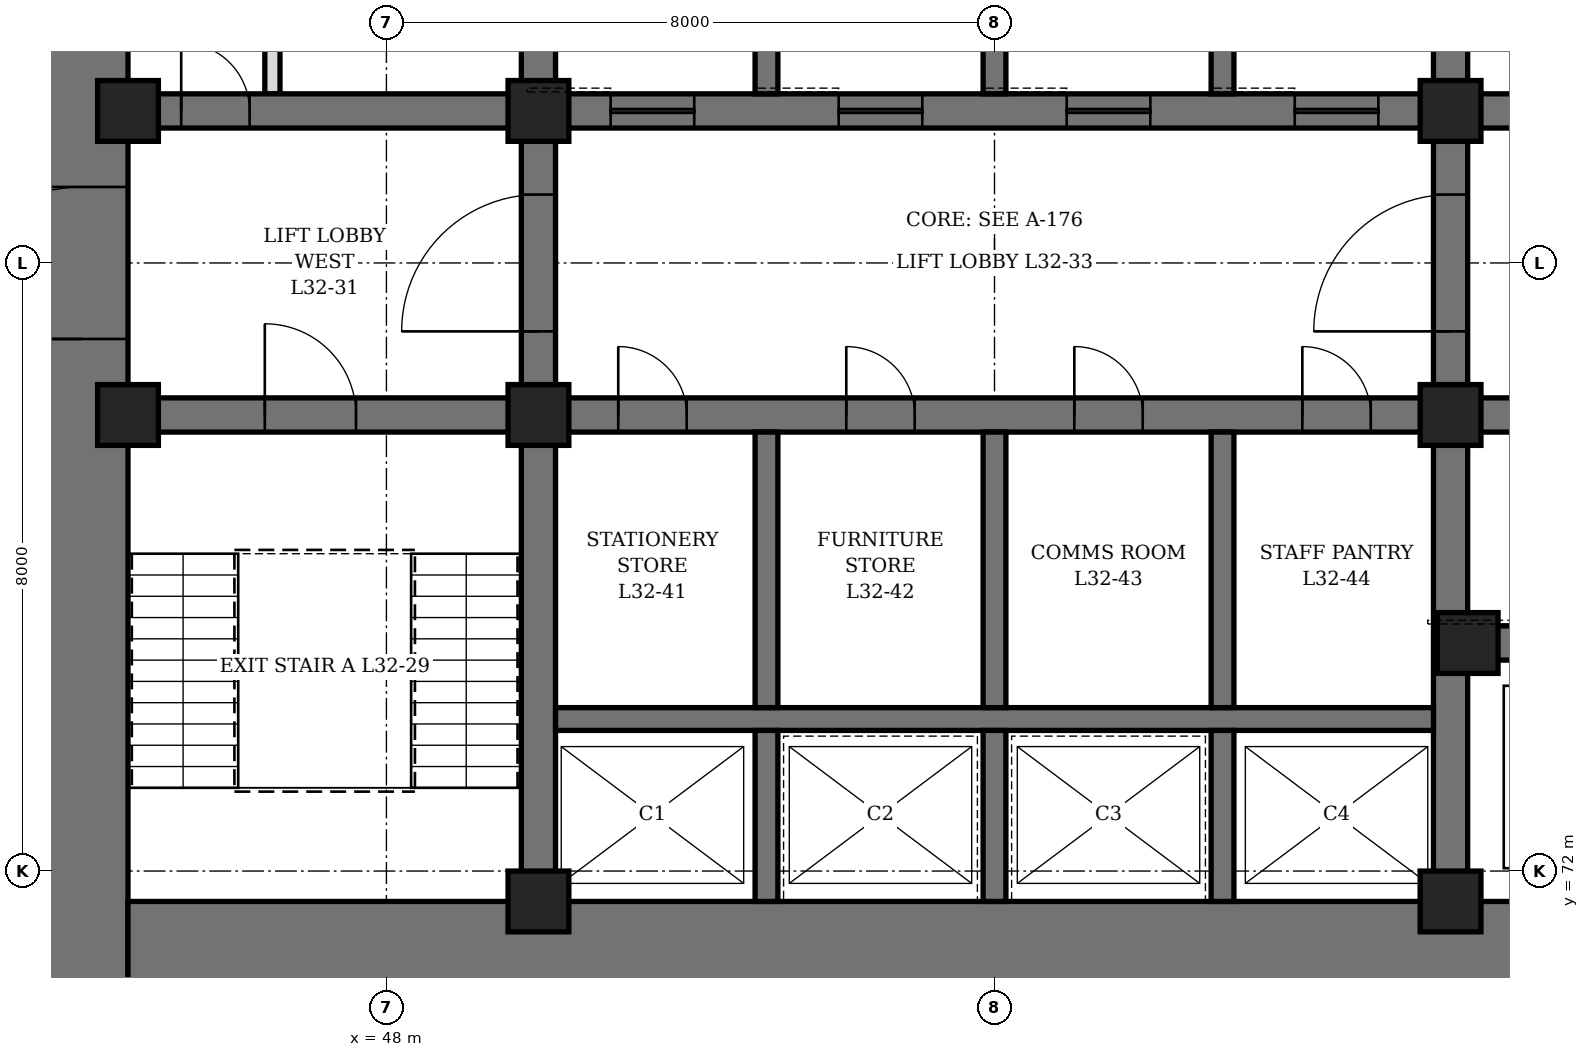
"""IFC4 building model, lengths in metres.
Left out: names, types, materials, properties, quantities, classifications, styles, units other than length and angle.
Written with IfcOpenShell. Run it as: python <this file> out.ifc"""

import sys

from ifc_helpers import new_model, si_unit, direction, frame, frame_2d, origin, origin_2d, place, context, subcontext, project, spatial, rectangle, hollow_rectangle, extrude, element, fill, save


model = new_model("IFC4")
c1 = context("Model", 3, precision=1e-05, world=origin(), true_north=direction((0.0, 1.0)))
c2 = subcontext(c1, "Body", "Model", "MODEL_VIEW")
j1 = project(units=[si_unit("LENGTHUNIT", "METRE"), si_unit("PLANEANGLEUNIT", "RADIAN")], contexts=[c1])
p1 = place(None, origin())
s1 = spatial("IfcSite", under=j1, at=p1, CompositionType="ELEMENT")
p2 = place(p1, origin())
s2 = spatial("IfcBuilding", under=s1, at=p2, CompositionType="ELEMENT")
p3 = place(p2, frame((0.0, 0.0, 145.9)))
s3 = spatial("IfcBuildingStorey", under=s2, at=p3, CompositionType="ELEMENT", Elevation=145.9)
p4 = place(p3, frame((44.0, 70.4, 0.0), z_axis=(0.0, 0.0, 1.0), x_axis=(0.0, 1.0, 0.0)))
e1 = element("IfcWall", 1, at=p4, inside=s3, PredefinedType="SHEAR", context=c2, shape_type="SweptSolid", body=[
    extrude(rectangle(XDim=19.2, YDim=1.2, at=frame_2d((9.6, 0.0))), origin(), (0.0, 0.0, 1.0), 4.2),
])
p5 = place(p4, frame((8.6, 0.0, 0.0)))
e2 = element("IfcOpeningElement", 2, at=p5, cuts=e1, PredefinedType="OPENING", context=c2, shape_type="SweptSolid", body=[
    extrude(rectangle(XDim=2.0, YDim=2.4, at=frame_2d((1.0, 1.2))), frame((0.0, 0.61, 0.0), z_axis=(0.0, -1.0, 0.0), x_axis=(1.0, 0.0, 0.0)), (0.0, 0.0, 1.0), 1.22),
])
p6 = place(p3, frame((44.6, 71.0, 0.0), z_axis=(0.0, 0.0, 1.0), x_axis=(1.0, 0.0, 0.0)))
e3 = element("IfcWall", 3, at=p6, inside=s3, PredefinedType="SHEAR", context=c2, shape_type="SweptSolid", body=[
    extrude(rectangle(XDim=22.8, YDim=1.2, at=frame_2d((11.4, 0.0))), origin(), (0.0, 0.0, 1.0), 4.2),
])
p7 = place(p3, frame((50.0, 71.6, 0.0), z_axis=(0.0, 0.0, 1.0), x_axis=(0.0, 1.0, 0.0)))
e4 = element("IfcWall", 4, at=p7, inside=s3, PredefinedType="SHEAR", context=c2, shape_type="SweptSolid", body=[
    extrude(rectangle(XDim=16.8, YDim=0.45, at=frame_2d((8.4, 0.0))), origin(), (0.0, 0.0, 1.0), 4.2),
])
p8 = place(p7, frame((7.5, 0.0, 0.0)))
e5 = element("IfcOpeningElement", 5, at=p8, cuts=e4, PredefinedType="OPENING", context=c2, shape_type="SweptSolid", body=[
    extrude(rectangle(XDim=1.8, YDim=2.4, at=frame_2d((0.9, 1.2))), frame((0.0, 0.235, 0.0), z_axis=(0.0, -1.0, 0.0), x_axis=(1.0, 0.0, 0.0)), (0.0, 0.0, 1.0), 0.47),
])
p9 = place(p3, frame((62.0, 71.6, 0.0), z_axis=(0.0, 0.0, 1.0), x_axis=(0.0, 1.0, 0.0)))
e6 = element("IfcWall", 6, at=p9, inside=s3, PredefinedType="SHEAR", context=c2, shape_type="SweptSolid", body=[
    extrude(rectangle(XDim=16.8, YDim=0.45, at=frame_2d((8.4, 0.0))), origin(), (0.0, 0.0, 1.0), 4.2),
])
p10 = place(p9, frame((7.5, 0.0, 0.0)))
e7 = element("IfcOpeningElement", 7, at=p10, cuts=e6, PredefinedType="OPENING", context=c2, shape_type="SweptSolid", body=[
    extrude(rectangle(XDim=1.8, YDim=2.4, at=frame_2d((0.9, 1.2))), frame((0.0, 0.235, 0.0), z_axis=(0.0, -1.0, 0.0), x_axis=(1.0, 0.0, 0.0)), (0.0, 0.0, 1.0), 0.47),
])
p11 = place(p3, frame((44.6, 78.0, 0.0), z_axis=(0.0, 0.0, 1.0), x_axis=(1.0, 0.0, 0.0)))
e8 = element("IfcWall", 8, at=p11, inside=s3, PredefinedType="SHEAR", context=c2, shape_type="SweptSolid", body=[
    extrude(rectangle(XDim=5.175, YDim=0.45, at=frame_2d((2.587, 0.0))), origin(), (0.0, 0.0, 1.0), 4.2),
])
p12 = place(p11, frame((1.8, 0.0, 0.0)))
e9 = element("IfcOpeningElement", 9, at=p12, cuts=e8, PredefinedType="OPENING", context=c2, shape_type="SweptSolid", body=[
    extrude(rectangle(XDim=1.2, YDim=2.1, at=frame_2d((0.6, 1.05))), frame((0.0, 0.235, 0.0), z_axis=(0.0, -1.0, 0.0), x_axis=(1.0, 0.0, 0.0)), (0.0, 0.0, 1.0), 0.47),
])
p13 = place(p3, frame((44.6, 82.0, 0.0), z_axis=(0.0, 0.0, 1.0), x_axis=(1.0, 0.0, 0.0)))
e10 = element("IfcWall", 10, at=p13, inside=s3, PredefinedType="SHEAR", context=c2, shape_type="SweptSolid", body=[
    extrude(rectangle(XDim=5.175, YDim=0.45, at=frame_2d((2.587, 0.0))), origin(), (0.0, 0.0, 1.0), 4.2),
])
p14 = place(p13, frame((0.7, 0.0, 0.0)))
e11 = element("IfcOpeningElement", 11, at=p14, cuts=e10, PredefinedType="OPENING", context=c2, shape_type="SweptSolid", body=[
    extrude(rectangle(XDim=0.9, YDim=2.1, at=frame_2d((0.45, 1.05))), frame((0.0, 0.235, 0.0), z_axis=(0.0, -1.0, 0.0), x_axis=(1.0, 0.0, 0.0)), (0.0, 0.0, 1.0), 0.47),
])
p15 = place(p3, frame((62.225, 75.0, 0.0), z_axis=(0.0, 0.0, 1.0), x_axis=(1.0, 0.0, 0.0)))
e12 = element("IfcWall", 12, at=p15, inside=s3, PredefinedType="SHEAR", context=c2, shape_type="SweptSolid", body=[
    extrude(rectangle(XDim=5.175, YDim=0.45, at=frame_2d((2.587, 0.0))), origin(), (0.0, 0.0, 1.0), 4.2),
])
p16 = place(p15, frame((0.675, 0.0, 0.0)))
e13 = element("IfcOpeningElement", 13, at=p16, cuts=e12, PredefinedType="OPENING", context=c2, shape_type="SweptSolid", body=[
    extrude(rectangle(XDim=1.2, YDim=2.2, at=frame_2d((0.6, 1.1))), frame((0.0, 0.235, 0.0), z_axis=(0.0, -1.0, 0.0), x_axis=(1.0, 0.0, 0.0)), (0.0, 0.0, 1.0), 0.47),
])
p17 = place(p15, frame((3.425, 0.0, 0.0)))
e14 = element("IfcOpeningElement", 14, at=p17, cuts=e12, PredefinedType="OPENING", context=c2, shape_type="SweptSolid", body=[
    extrude(rectangle(XDim=1.2, YDim=2.2, at=frame_2d((0.6, 1.1))), frame((0.0, 0.235, 0.0), z_axis=(0.0, -1.0, 0.0), x_axis=(1.0, 0.0, 0.0)), (0.0, 0.0, 1.0), 0.47),
])
p18 = place(p3, frame((62.225, 78.0, 0.0), z_axis=(0.0, 0.0, 1.0), x_axis=(1.0, 0.0, 0.0)))
e15 = element("IfcWall", 15, at=p18, inside=s3, PredefinedType="SHEAR", context=c2, shape_type="SweptSolid", body=[
    extrude(rectangle(XDim=5.175, YDim=0.45, at=frame_2d((2.587, 0.0))), origin(), (0.0, 0.0, 1.0), 4.2),
])
p19 = place(p18, frame((2.175, 0.0, 0.0)))
e16 = element("IfcOpeningElement", 16, at=p19, cuts=e15, PredefinedType="OPENING", context=c2, shape_type="SweptSolid", body=[
    extrude(rectangle(XDim=1.2, YDim=2.1, at=frame_2d((0.6, 1.05))), frame((0.0, 0.235, 0.0), z_axis=(0.0, -1.0, 0.0), x_axis=(1.0, 0.0, 0.0)), (0.0, 0.0, 1.0), 0.47),
])
p20 = place(p3, frame((62.225, 82.0, 0.0), z_axis=(0.0, 0.0, 1.0), x_axis=(1.0, 0.0, 0.0)))
e17 = element("IfcWall", 17, at=p20, inside=s3, PredefinedType="SHEAR", context=c2, shape_type="SweptSolid", body=[
    extrude(rectangle(XDim=5.175, YDim=0.45, at=frame_2d((2.587, 0.0))), origin(), (0.0, 0.0, 1.0), 4.2),
])
p21 = place(p20, frame((2.175, 0.0, 0.0)))
e18 = element("IfcOpeningElement", 18, at=p21, cuts=e17, PredefinedType="OPENING", context=c2, shape_type="SweptSolid", body=[
    extrude(rectangle(XDim=1.2, YDim=2.1, at=frame_2d((0.6, 1.05))), frame((0.0, 0.235, 0.0), z_axis=(0.0, -1.0, 0.0), x_axis=(1.0, 0.0, 0.0)), (0.0, 0.0, 1.0), 0.47),
])
p22 = place(p3, frame((50.225, 78.0, 0.0), z_axis=(0.0, 0.0, 1.0), x_axis=(1.0, 0.0, 0.0)))
e19 = element("IfcWall", 19, at=p22, inside=s3, PredefinedType="SHEAR", context=c2, shape_type="SweptSolid", body=[
    extrude(rectangle(XDim=11.55, YDim=0.45, at=frame_2d((5.775, 0.0))), origin(), (0.0, 0.0, 1.0), 4.2),
])
p23 = place(p22, frame((0.825, 0.0, 0.0)))
e20 = element("IfcOpeningElement", 20, at=p23, cuts=e19, PredefinedType="OPENING", context=c2, shape_type="SweptSolid", body=[
    extrude(rectangle(XDim=0.9, YDim=2.1, at=frame_2d((0.45, 1.05))), frame((0.0, 0.235, 0.0), z_axis=(0.0, -1.0, 0.0), x_axis=(1.0, 0.0, 0.0)), (0.0, 0.0, 1.0), 0.47),
])
p24 = place(p22, frame((3.825, 0.0, 0.0)))
e21 = element("IfcOpeningElement", 21, at=p24, cuts=e19, PredefinedType="OPENING", context=c2, shape_type="SweptSolid", body=[
    extrude(rectangle(XDim=0.9, YDim=2.1, at=frame_2d((0.45, 1.05))), frame((0.0, 0.235, 0.0), z_axis=(0.0, -1.0, 0.0), x_axis=(1.0, 0.0, 0.0)), (0.0, 0.0, 1.0), 0.47),
])
p25 = place(p22, frame((6.825, 0.0, 0.0)))
e22 = element("IfcOpeningElement", 22, at=p25, cuts=e19, PredefinedType="OPENING", context=c2, shape_type="SweptSolid", body=[
    extrude(rectangle(XDim=0.9, YDim=2.1, at=frame_2d((0.45, 1.05))), frame((0.0, 0.235, 0.0), z_axis=(0.0, -1.0, 0.0), x_axis=(1.0, 0.0, 0.0)), (0.0, 0.0, 1.0), 0.47),
])
p26 = place(p22, frame((9.825, 0.0, 0.0)))
e23 = element("IfcOpeningElement", 23, at=p26, cuts=e19, PredefinedType="OPENING", context=c2, shape_type="SweptSolid", body=[
    extrude(rectangle(XDim=0.9, YDim=2.1, at=frame_2d((0.45, 1.05))), frame((0.0, 0.235, 0.0), z_axis=(0.0, -1.0, 0.0), x_axis=(1.0, 0.0, 0.0)), (0.0, 0.0, 1.0), 0.47),
])
p27 = place(p3, frame((50.225, 82.0, 0.0), z_axis=(0.0, 0.0, 1.0), x_axis=(1.0, 0.0, 0.0)))
e24 = element("IfcWall", 24, at=p27, inside=s3, PredefinedType="SHEAR", context=c2, shape_type="SweptSolid", body=[
    extrude(rectangle(XDim=11.55, YDim=0.45, at=frame_2d((5.775, 0.0))), origin(), (0.0, 0.0, 1.0), 4.2),
])
p28 = place(p27, frame((0.725, 0.0, 0.0)))
e25 = element("IfcOpeningElement", 25, at=p28, cuts=e24, PredefinedType="OPENING", context=c2, shape_type="SweptSolid", body=[
    extrude(rectangle(XDim=1.1, YDim=2.2, at=frame_2d((0.55, 1.1))), frame((0.0, 0.235, 0.0), z_axis=(0.0, -1.0, 0.0), x_axis=(1.0, 0.0, 0.0)), (0.0, 0.0, 1.0), 0.47),
])
p29 = place(p27, frame((3.725, 0.0, 0.0)))
e26 = element("IfcOpeningElement", 26, at=p29, cuts=e24, PredefinedType="OPENING", context=c2, shape_type="SweptSolid", body=[
    extrude(rectangle(XDim=1.1, YDim=2.2, at=frame_2d((0.55, 1.1))), frame((0.0, 0.235, 0.0), z_axis=(0.0, -1.0, 0.0), x_axis=(1.0, 0.0, 0.0)), (0.0, 0.0, 1.0), 0.47),
])
p30 = place(p27, frame((6.725, 0.0, 0.0)))
e27 = element("IfcOpeningElement", 27, at=p30, cuts=e24, PredefinedType="OPENING", context=c2, shape_type="SweptSolid", body=[
    extrude(rectangle(XDim=1.1, YDim=2.2, at=frame_2d((0.55, 1.1))), frame((0.0, 0.235, 0.0), z_axis=(0.0, -1.0, 0.0), x_axis=(1.0, 0.0, 0.0)), (0.0, 0.0, 1.0), 0.47),
])
p31 = place(p27, frame((9.725, 0.0, 0.0)))
e28 = element("IfcOpeningElement", 28, at=p31, cuts=e24, PredefinedType="OPENING", context=c2, shape_type="SweptSolid", body=[
    extrude(rectangle(XDim=1.1, YDim=2.2, at=frame_2d((0.55, 1.1))), frame((0.0, 0.235, 0.0), z_axis=(0.0, -1.0, 0.0), x_axis=(1.0, 0.0, 0.0)), (0.0, 0.0, 1.0), 0.47),
])
p32 = place(p3, frame((50.225, 74.0, 0.0), z_axis=(0.0, 0.0, 1.0), x_axis=(1.0, 0.0, 0.0)))
e29 = element("IfcWall", 29, at=p32, inside=s3, PredefinedType="SHEAR", context=c2, shape_type="SweptSolid", body=[
    extrude(rectangle(XDim=11.55, YDim=0.3, at=frame_2d((5.775, 0.0))), origin(), (0.0, 0.0, 1.0), 4.2),
])
p33 = place(p3, frame((53.0, 71.6, 0.0), z_axis=(0.0, 0.0, 1.0), x_axis=(0.0, 1.0, 0.0)))
e30 = element("IfcWall", 30, at=p33, inside=s3, PredefinedType="SHEAR", context=c2, shape_type="SweptSolid", body=[
    extrude(rectangle(XDim=2.25, YDim=0.3, at=frame_2d((1.125, 0.0))), origin(), (0.0, 0.0, 1.0), 4.2),
])
p34 = place(p3, frame((53.0, 74.15, 0.0), z_axis=(0.0, 0.0, 1.0), x_axis=(0.0, 1.0, 0.0)))
e31 = element("IfcWall", 31, at=p34, inside=s3, PredefinedType="SHEAR", context=c2, shape_type="SweptSolid", body=[
    extrude(rectangle(XDim=3.625, YDim=0.3, at=frame_2d((1.812, 0.0))), origin(), (0.0, 0.0, 1.0), 4.2),
])
p35 = place(p3, frame((53.0, 82.225, 0.0), z_axis=(0.0, 0.0, 1.0), x_axis=(0.0, 1.0, 0.0)))
e32 = element("IfcWall", 32, at=p35, inside=s3, PredefinedType="SHEAR", context=c2, shape_type="SweptSolid", body=[
    extrude(rectangle(XDim=3.55, YDim=0.3, at=frame_2d((1.775, 0.0))), origin(), (0.0, 0.0, 1.0), 4.2),
])
p36 = place(p3, frame((56.0, 71.6, 0.0), z_axis=(0.0, 0.0, 1.0), x_axis=(0.0, 1.0, 0.0)))
e33 = element("IfcWall", 33, at=p36, inside=s3, PredefinedType="SHEAR", context=c2, shape_type="SweptSolid", body=[
    extrude(rectangle(XDim=2.25, YDim=0.3, at=frame_2d((1.125, 0.0))), origin(), (0.0, 0.0, 1.0), 4.2),
])
p37 = place(p3, frame((56.0, 74.15, 0.0), z_axis=(0.0, 0.0, 1.0), x_axis=(0.0, 1.0, 0.0)))
e34 = element("IfcWall", 34, at=p37, inside=s3, PredefinedType="SHEAR", context=c2, shape_type="SweptSolid", body=[
    extrude(rectangle(XDim=3.625, YDim=0.3, at=frame_2d((1.812, 0.0))), origin(), (0.0, 0.0, 1.0), 4.2),
])
p38 = place(p3, frame((56.0, 82.225, 0.0), z_axis=(0.0, 0.0, 1.0), x_axis=(0.0, 1.0, 0.0)))
e35 = element("IfcWall", 35, at=p38, inside=s3, PredefinedType="SHEAR", context=c2, shape_type="SweptSolid", body=[
    extrude(rectangle(XDim=3.55, YDim=0.3, at=frame_2d((1.775, 0.0))), origin(), (0.0, 0.0, 1.0), 4.2),
])
p39 = place(p3, frame((59.0, 71.6, 0.0), z_axis=(0.0, 0.0, 1.0), x_axis=(0.0, 1.0, 0.0)))
e36 = element("IfcWall", 36, at=p39, inside=s3, PredefinedType="SHEAR", context=c2, shape_type="SweptSolid", body=[
    extrude(rectangle(XDim=2.25, YDim=0.3, at=frame_2d((1.125, 0.0))), origin(), (0.0, 0.0, 1.0), 4.2),
])
p40 = place(p3, frame((59.0, 74.15, 0.0), z_axis=(0.0, 0.0, 1.0), x_axis=(0.0, 1.0, 0.0)))
e37 = element("IfcWall", 37, at=p40, inside=s3, PredefinedType="SHEAR", context=c2, shape_type="SweptSolid", body=[
    extrude(rectangle(XDim=3.625, YDim=0.3, at=frame_2d((1.812, 0.0))), origin(), (0.0, 0.0, 1.0), 4.2),
])
p41 = place(p3, frame((59.0, 82.225, 0.0), z_axis=(0.0, 0.0, 1.0), x_axis=(0.0, 1.0, 0.0)))
e38 = element("IfcWall", 38, at=p41, inside=s3, PredefinedType="SHEAR", context=c2, shape_type="SweptSolid", body=[
    extrude(rectangle(XDim=3.55, YDim=0.3, at=frame_2d((1.775, 0.0))), origin(), (0.0, 0.0, 1.0), 4.2),
])
for number, where, z_axis, x_axis in (
    (39, (44.6, 78.0, 0.0), (0.0, 0.0, 1.0), (1.0, 0.0, 0.0)),
    (40, (44.6, 82.0, 0.0), (0.0, 0.0, 1.0), (1.0, 0.0, 0.0)),
    (41, (50.0, 71.6, 0.0), (0.0, 0.0, 1.0), (1.0, 0.0, 0.0)),
    (42, (50.0, 78.0, 0.0), (0.0, 0.0, 1.0), (1.0, 0.0, 0.0)),
    (43, (50.0, 82.0, 0.0), (0.0, 0.0, 1.0), (1.0, 0.0, 0.0)),
    (44, (62.0, 71.6, 0.0), (0.0, 0.0, 1.0), (1.0, 0.0, 0.0)),
    (45, (62.0, 78.0, 0.0), (0.0, 0.0, 1.0), (1.0, 0.0, 0.0)),
    (46, (62.0, 82.0, 0.0), (0.0, 0.0, 1.0), (1.0, 0.0, 0.0)),
    (47, (62.225, 75.0, 0.0), (0.0, 0.0, 1.0), (1.0, 0.0, 0.0)),
):
    element("IfcColumn", number, at=place(p3, frame(where, z_axis=z_axis, x_axis=x_axis)), inside=s3, PredefinedType="COLUMN", context=c2, shape_type="SweptSolid", body=[
        extrude(hollow_rectangle(XDim=0.8, YDim=0.8, WallThickness=0.1, at=origin_2d()), origin(), (0.0, 0.0, 1.0), 4.2),
    ])
p42 = place(p3, frame((46.5, 82.225, 0.0), z_axis=(0.0, 0.0, 1.0), x_axis=(0.0, 1.0, 0.0)))
e48 = element("IfcWall", 48, at=p42, inside=s3, PredefinedType="PARTITIONING", context=c2, shape_type="SweptSolid", body=[
    extrude(rectangle(XDim=3.05, YDim=0.2, at=frame_2d((1.525, 0.0))), origin(), (0.0, 0.0, 1.0), 4.04),
])
p43 = place(p42, frame((1.075, 0.0, 0.0)))
e49 = element("IfcOpeningElement", 49, at=p43, cuts=e48, PredefinedType="OPENING", context=c2, shape_type="SweptSolid", body=[
    extrude(rectangle(XDim=0.9, YDim=2.1, at=frame_2d((0.45, 1.05))), frame((0.0, 0.11, 0.0), z_axis=(0.0, -1.0, 0.0), x_axis=(1.0, 0.0, 0.0)), (0.0, 0.0, 1.0), 0.22),
])
p44 = place(p14, origin())
e50 = element("IfcDoor", 50, at=p44, inside=s3, OperationType="SINGLE_SWING_LEFT", PredefinedType="DOOR", context=c2, shape_type="SweptSolid", body=[
    extrude(rectangle(XDim=0.9, YDim=2.1, at=frame_2d((0.45, 1.05))), frame((0.0, 0.225, 0.0), z_axis=(0.0, -1.0, 0.0), x_axis=(1.0, 0.0, 0.0)), (0.0, 0.0, 1.0), 0.449),
])
fill(e11, e50)
p45 = place(p23, origin())
e51 = element("IfcDoor", 51, at=p45, inside=s3, OperationType="SINGLE_SWING_LEFT", PredefinedType="DOOR", context=c2, shape_type="SweptSolid", body=[
    extrude(rectangle(XDim=0.9, YDim=2.1, at=frame_2d((0.45, 1.05))), frame((0.0, 0.225, 0.0), z_axis=(0.0, -1.0, 0.0), x_axis=(1.0, 0.0, 0.0)), (0.0, 0.0, 1.0), 0.449),
])
fill(e20, e51)
p46 = place(p24, origin())
e52 = element("IfcDoor", 52, at=p46, inside=s3, OperationType="SINGLE_SWING_LEFT", PredefinedType="DOOR", context=c2, shape_type="SweptSolid", body=[
    extrude(rectangle(XDim=0.9, YDim=2.1, at=frame_2d((0.45, 1.05))), frame((0.0, 0.225, 0.0), z_axis=(0.0, -1.0, 0.0), x_axis=(1.0, 0.0, 0.0)), (0.0, 0.0, 1.0), 0.449),
])
fill(e21, e52)
p47 = place(p25, origin())
e53 = element("IfcDoor", 53, at=p47, inside=s3, OperationType="SINGLE_SWING_LEFT", PredefinedType="DOOR", context=c2, shape_type="SweptSolid", body=[
    extrude(rectangle(XDim=0.9, YDim=2.1, at=frame_2d((0.45, 1.05))), frame((0.0, 0.225, 0.0), z_axis=(0.0, -1.0, 0.0), x_axis=(1.0, 0.0, 0.0)), (0.0, 0.0, 1.0), 0.449),
])
fill(e22, e53)
p48 = place(p26, origin())
e54 = element("IfcDoor", 54, at=p48, inside=s3, OperationType="SINGLE_SWING_LEFT", PredefinedType="DOOR", context=c2, shape_type="SweptSolid", body=[
    extrude(rectangle(XDim=0.9, YDim=2.1, at=frame_2d((0.45, 1.05))), frame((0.0, 0.225, 0.0), z_axis=(0.0, -1.0, 0.0), x_axis=(1.0, 0.0, 0.0)), (0.0, 0.0, 1.0), 0.449),
])
fill(e23, e54)
p49 = place(p12, origin())
e55 = element("IfcDoor", 55, at=p49, inside=s3, OperationType="SINGLE_SWING_LEFT", PredefinedType="DOOR", context=c2, shape_type="SweptSolid", body=[
    extrude(rectangle(XDim=1.2, YDim=2.1, at=frame_2d((0.6, 1.05))), frame((0.0, 0.225, 0.0), z_axis=(0.0, -1.0, 0.0), x_axis=(1.0, 0.0, 0.0)), (0.0, 0.0, 1.0), 0.449),
])
fill(e9, e55)
p50 = place(p5, origin())
e56 = element("IfcDoor", 56, at=p50, inside=s3, OperationType="DOUBLE_DOOR_SINGLE_SWING", PredefinedType="DOOR", context=c2, shape_type="SweptSolid", body=[
    extrude(rectangle(XDim=2.0, YDim=2.4, at=frame_2d((1.0, 1.2))), frame((0.0, 0.35, 0.0), z_axis=(0.0, -1.0, 0.0), x_axis=(1.0, 0.0, 0.0)), (0.0, 0.0, 1.0), 0.7),
])
fill(e2, e56)
p51 = place(p8, origin())
e57 = element("IfcDoor", 57, at=p51, inside=s3, OperationType="DOUBLE_DOOR_SINGLE_SWING", PredefinedType="DOOR", context=c2, shape_type="SweptSolid", body=[
    extrude(rectangle(XDim=1.8, YDim=2.4, at=frame_2d((0.9, 1.2))), frame((0.0, 0.225, 0.0), z_axis=(0.0, -1.0, 0.0), x_axis=(1.0, 0.0, 0.0)), (0.0, 0.0, 1.0), 0.449),
])
fill(e5, e57)
p52 = place(p10, origin())
e58 = element("IfcDoor", 58, at=p52, inside=s3, OperationType="DOUBLE_DOOR_SINGLE_SWING", PredefinedType="DOOR", context=c2, shape_type="SweptSolid", body=[
    extrude(rectangle(XDim=1.8, YDim=2.4, at=frame_2d((0.9, 1.2))), frame((0.0, 0.225, 0.0), z_axis=(0.0, -1.0, 0.0), x_axis=(1.0, 0.0, 0.0)), (0.0, 0.0, 1.0), 0.449),
])
fill(e7, e58)
p53 = place(p28, origin())
e59 = element("IfcDoor", 59, at=p53, inside=s3, OperationType="SLIDING_TO_LEFT", PredefinedType="DOOR", context=c2, shape_type="SweptSolid", body=[
    extrude(rectangle(XDim=1.1, YDim=2.2, at=frame_2d((0.55, 1.1))), frame((0.0, 0.225, 0.0), z_axis=(0.0, -1.0, 0.0), x_axis=(1.0, 0.0, 0.0)), (0.0, 0.0, 1.0), 0.449),
])
fill(e25, e59)
p54 = place(p29, origin())
e60 = element("IfcDoor", 60, at=p54, inside=s3, OperationType="SLIDING_TO_LEFT", PredefinedType="DOOR", context=c2, shape_type="SweptSolid", body=[
    extrude(rectangle(XDim=1.1, YDim=2.2, at=frame_2d((0.55, 1.1))), frame((0.0, 0.225, 0.0), z_axis=(0.0, -1.0, 0.0), x_axis=(1.0, 0.0, 0.0)), (0.0, 0.0, 1.0), 0.449),
])
fill(e26, e60)
p55 = place(p30, origin())
e61 = element("IfcDoor", 61, at=p55, inside=s3, OperationType="SLIDING_TO_LEFT", PredefinedType="DOOR", context=c2, shape_type="SweptSolid", body=[
    extrude(rectangle(XDim=1.1, YDim=2.2, at=frame_2d((0.55, 1.1))), frame((0.0, 0.225, 0.0), z_axis=(0.0, -1.0, 0.0), x_axis=(1.0, 0.0, 0.0)), (0.0, 0.0, 1.0), 0.449),
])
fill(e27, e61)
p56 = place(p31, origin())
e62 = element("IfcDoor", 62, at=p56, inside=s3, OperationType="SLIDING_TO_LEFT", PredefinedType="DOOR", context=c2, shape_type="SweptSolid", body=[
    extrude(rectangle(XDim=1.1, YDim=2.2, at=frame_2d((0.55, 1.1))), frame((0.0, 0.225, 0.0), z_axis=(0.0, -1.0, 0.0), x_axis=(1.0, 0.0, 0.0)), (0.0, 0.0, 1.0), 0.449),
])
fill(e28, e62)
save(model, sys.argv[1])
